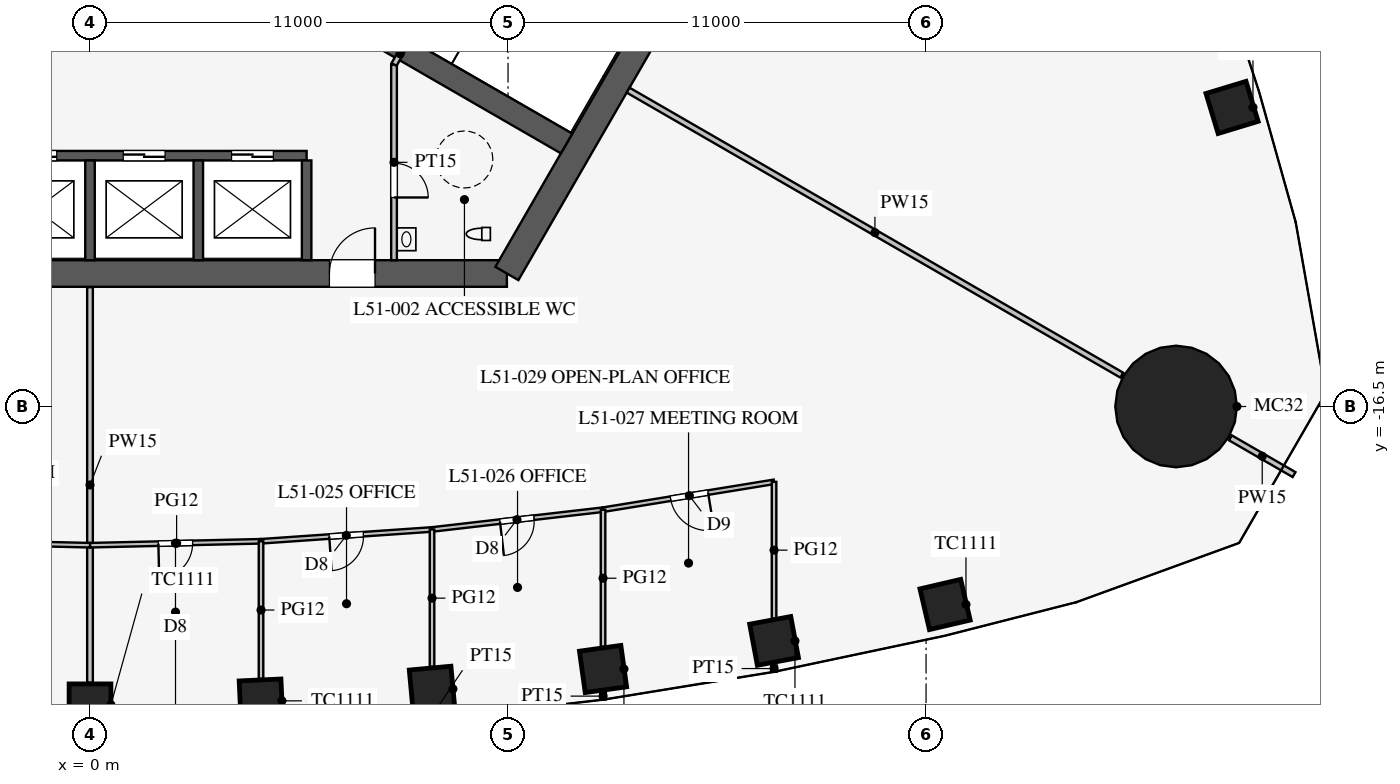
"""IFC4 building model, lengths in metres.
Left out: names, types, materials, properties, quantities, classifications, styles, units other than length and angle.
Written with IfcOpenShell. Run it as: python <this file> out.ifc"""

import sys

from ifc_helpers import new_model, si_unit, direction, frame, frame_2d, origin, origin_2d, place, context, subcontext, project, spatial, rectangle, circle, extrude, element, fill, save


model = new_model("IFC4")
c1 = context("Model", 3, precision=1e-05, world=origin(), true_north=direction((0.0, 1.0)))
c2 = subcontext(c1, "Body", "Model", "MODEL_VIEW")
j1 = project(units=[si_unit("LENGTHUNIT", "METRE"), si_unit("PLANEANGLEUNIT", "RADIAN")], contexts=[c1])
p1 = place(None, origin())
s1 = spatial("IfcSite", under=j1, at=p1, CompositionType="ELEMENT")
p2 = place(p1, origin())
s2 = spatial("IfcBuilding", under=s1, at=p2, CompositionType="ELEMENT")
p3 = place(p2, frame((0.0, 0.0, 223.3)))
s3 = spatial("IfcBuildingStorey", under=s2, at=p3, CompositionType="ELEMENT", Elevation=223.3)
for number, where, z_axis, x_axis in (
    (1, (0.0, -24.351, 0.0), (0.0, 0.0, 1.0), (1.0, 0.0, 0.0)),
    (2, (4.5, -24.246, 0.0), (0.0, 0.0, 1.0), (0.999, 0.046, 0.0)),
    (3, (9.0, -23.933, 0.0), (0.0, 0.0, 1.0), (0.996, 0.092, 0.0)),
    (4, (13.5, -23.408, 0.0), (0.0, 0.0, 1.0), (0.99, 0.138, 0.0)),
    (5, (18.0, -22.669, 0.0), (0.0, 0.0, 1.0), (0.983, 0.184, 0.0)),
    (6, (22.5, -21.71, 0.0), (0.0, 0.0, 1.0), (0.974, 0.227, 0.0)),
    (7, (30.052, -8.63, 0.0), (0.0, 0.0, 1.0), (-0.29, 0.957, 0.0)),
):
    element("IfcColumn", number, at=place(p3, frame(where, z_axis=z_axis, x_axis=x_axis)), inside=s3, PredefinedType="COLUMN", context=c2, shape_type="SweptSolid", body=[
        extrude(rectangle(XDim=1.1, YDim=1.1, at=origin_2d()), origin(), (0.0, 0.0, 1.0), 4.2),
    ])
p4 = place(p3, frame((28.579, -16.5, 0.0), z_axis=(0.0, 0.0, 1.0), x_axis=(1.0, 0.0, 0.0)))
e8 = element("IfcColumn", 8, at=p4, inside=s3, PredefinedType="COLUMN", context=c2, shape_type="SweptSolid", body=[
    extrude(circle(Radius=1.6, at=origin_2d()), origin(), (0.0, 0.0, 1.0), 4.2),
])
p5 = place(p3, frame((-10.97, -13.0, 0.0), z_axis=(0.0, 0.0, 1.0), x_axis=(1.0, 0.0, 0.0)))
e9 = element("IfcWall", 9, at=p5, inside=s3, PredefinedType="SHEAR", context=c2, shape_type="SweptSolid", body=[
    extrude(rectangle(XDim=21.939, YDim=0.7, at=frame_2d((10.97, 0.0))), origin(), (0.0, 0.0, 1.0), 4.2),
])
p6 = place(p5, frame((17.27, 0.0, 0.0)))
e10 = element("IfcOpeningElement", 10, at=p6, cuts=e9, PredefinedType="OPENING", context=c2, shape_type="SweptSolid", body=[
    extrude(rectangle(XDim=1.2, YDim=2.1, at=frame_2d((0.6, 1.05))), frame((0.0, 0.36, 0.0), z_axis=(0.0, -1.0, 0.0), x_axis=(1.0, 0.0, 0.0)), (0.0, 0.0, 1.0), 0.72),
])
p7 = place(p5, frame((3.47, 0.0, 0.0)))
e11 = element("IfcOpeningElement", 11, at=p7, cuts=e9, PredefinedType="OPENING", context=c2, shape_type="SweptSolid", body=[
    extrude(rectangle(XDim=1.2, YDim=2.1, at=frame_2d((0.6, 1.05))), frame((0.0, 0.36, 0.0), z_axis=(0.0, -1.0, 0.0), x_axis=(1.0, 0.0, 0.0)), (0.0, 0.0, 1.0), 0.72),
])
p8 = place(p3, frame((10.97, -13.0, 0.0), z_axis=(0.0, 0.0, 1.0), x_axis=(0.499995765644, 0.866027848477, 0.0)))
e12 = element("IfcWall", 12, at=p8, inside=s3, PredefinedType="SHEAR", context=c2, shape_type="SweptSolid", body=[
    extrude(rectangle(XDim=11.547, YDim=0.7, at=frame_2d((5.773, 0.0))), origin(), (0.0, 0.0, 1.0), 4.2),
])
p9 = place(p3, frame((-5.7, -9.9, 0.0), z_axis=(0.0, 0.0, 1.0), x_axis=(1.0, 0.0, 0.0)))
e13 = element("IfcWall", 13, at=p9, inside=s3, PredefinedType="SHEAR", context=c2, shape_type="SweptSolid", body=[
    extrude(rectangle(XDim=11.4, YDim=0.25, at=frame_2d((5.7, 0.0))), origin(), (0.0, 0.0, 1.0), 4.2),
])
p10 = place(p9, frame((0.875, 0.0, 0.0)))
e14 = element("IfcOpeningElement", 14, at=p10, cuts=e13, PredefinedType="OPENING", context=c2, shape_type="SweptSolid", body=[
    extrude(rectangle(XDim=1.1, YDim=2.2, at=frame_2d((0.55, 1.1))), frame((0.0, 0.135, 0.0), z_axis=(0.0, -1.0, 0.0), x_axis=(1.0, 0.0, 0.0)), (0.0, 0.0, 1.0), 0.27),
])
p11 = place(p9, frame((3.725, 0.0, 0.0)))
e15 = element("IfcOpeningElement", 15, at=p11, cuts=e13, PredefinedType="OPENING", context=c2, shape_type="SweptSolid", body=[
    extrude(rectangle(XDim=1.1, YDim=2.2, at=frame_2d((0.55, 1.1))), frame((0.0, 0.135, 0.0), z_axis=(0.0, -1.0, 0.0), x_axis=(1.0, 0.0, 0.0)), (0.0, 0.0, 1.0), 0.27),
])
p12 = place(p9, frame((6.575, 0.0, 0.0)))
e16 = element("IfcOpeningElement", 16, at=p12, cuts=e13, PredefinedType="OPENING", context=c2, shape_type="SweptSolid", body=[
    extrude(rectangle(XDim=1.1, YDim=2.2, at=frame_2d((0.55, 1.1))), frame((0.0, 0.135, 0.0), z_axis=(0.0, -1.0, 0.0), x_axis=(1.0, 0.0, 0.0)), (0.0, 0.0, 1.0), 0.27),
])
p13 = place(p9, frame((9.425, 0.0, 0.0)))
e17 = element("IfcOpeningElement", 17, at=p13, cuts=e13, PredefinedType="OPENING", context=c2, shape_type="SweptSolid", body=[
    extrude(rectangle(XDim=1.1, YDim=2.2, at=frame_2d((0.55, 1.1))), frame((0.0, 0.135, 0.0), z_axis=(0.0, -1.0, 0.0), x_axis=(1.0, 0.0, 0.0)), (0.0, 0.0, 1.0), 0.27),
])
for number, where, z_axis, x_axis in (
    (18, (0.0, -10.025, 0.0), (0.0, 0.0, 1.0), (0.0, -1.0, 0.0)),
    (19, (2.85, -10.025, 0.0), (0.0, 0.0, 1.0), (0.0, -1.0, 0.0)),
    (20, (5.7, -10.025, 0.0), (0.0, 0.0, 1.0), (0.0, -1.0, 0.0)),
):
    element("IfcWall", number, at=place(p3, frame(where, z_axis=z_axis, x_axis=x_axis)), inside=s3, PredefinedType="SHEAR", context=c2, shape_type="SweptSolid", body=[
        extrude(rectangle(XDim=2.625, YDim=0.25, at=frame_2d((1.312, 0.0))), origin(), (0.0, 0.0, 1.0), 4.2),
    ])
p14 = place(p3, frame((4.638, -5.016, 0.0), z_axis=(0.0, 0.0, 1.0), x_axis=(0.866021621257, -0.500006551472, 0.0)))
e21 = element("IfcWall", 21, at=p14, inside=s3, PredefinedType="SHEAR", context=c2, shape_type="SweptSolid", body=[
    extrude(rectangle(XDim=9.125, YDim=0.6, at=frame_2d((4.562, 0.0))), origin(), (0.0, 0.0, 1.0), 4.2),
])
p15 = place(p3, frame((8.0, -7.5, 0.0), z_axis=(0.0, 0.0, 1.0), x_axis=(0.0, -1.0, 0.0)))
e22 = element("IfcWall", 22, at=p15, inside=s3, PredefinedType="PARTITIONING", context=c2, shape_type="SweptSolid", body=[
    extrude(rectangle(XDim=5.15, YDim=0.15, at=frame_2d((2.575, 0.0))), origin(), (0.0, 0.0, 1.0), 4.0),
])
p16 = place(p15, frame((2.6, 0.0, 0.0)))
e23 = element("IfcOpeningElement", 23, at=p16, cuts=e22, PredefinedType="OPENING", context=c2, shape_type="SweptSolid", body=[
    extrude(rectangle(XDim=0.9, YDim=2.1, at=frame_2d((0.45, 1.05))), frame((0.0, 0.085, 0.0), z_axis=(0.0, -1.0, 0.0), x_axis=(1.0, 0.0, 0.0)), (0.0, 0.0, 1.0), 0.17),
])
p17 = place(p3, frame((8.0, -7.5, 0.0), z_axis=(0.0, 0.0, 1.0), x_axis=(0.499842556608, 0.866116284689, 0.0)))
e24 = element("IfcWall", 24, at=p17, inside=s3, PredefinedType="PARTITIONING", context=c2, shape_type="SweptSolid", body=[
    extrude(rectangle(XDim=0.645, YDim=0.15, at=frame_2d((0.323, 0.0))), origin(), (0.0, 0.0, 1.0), 4.0),
])
p18 = place(p3, frame((14.159, -8.175, 0.0), z_axis=(0.0, 0.0, 1.0), x_axis=(0.866027028085, -0.499997186618, 0.0)))
e25 = element("IfcWall", 25, at=p18, inside=s3, PredefinedType="PARTITIONING", context=c2, shape_type="SweptSolid", body=[
    extrude(rectangle(XDim=15.0, YDim=0.15, at=frame_2d((7.5, 0.0))), origin(), (0.0, 0.0, 1.0), 2.4),
])
p19 = place(p3, frame((30.008, -17.325, 0.0), z_axis=(0.0, 0.0, 1.0), x_axis=(0.866013246922, -0.500021055713, 0.0)))
e26 = element("IfcWall", 26, at=p19, inside=s3, PredefinedType="PARTITIONING", context=c2, shape_type="SweptSolid", body=[
    extrude(rectangle(XDim=1.935, YDim=0.15, at=frame_2d((0.967, 0.0))), origin(), (0.0, 0.0, 1.0), 2.4),
])
p20 = place(p3, frame((0.0, -13.36, 0.0), z_axis=(0.0, 0.0, 1.0), x_axis=(0.0, -1.0, 0.0)))
e27 = element("IfcWall", 27, at=p20, inside=s3, PredefinedType="PARTITIONING", context=c2, shape_type="SweptSolid", body=[
    extrude(rectangle(XDim=10.411, YDim=0.15, at=frame_2d((5.205, 0.0))), origin(), (0.0, 0.0, 1.0), 3.3),
])
p21 = place(p3, frame((13.5, -24.033, 0.0), z_axis=(0.0, 0.0, 1.0), x_axis=(0.0, -1.0, 0.0)))
e28 = element("IfcWall", 28, at=p21, inside=s3, PredefinedType="PARTITIONING", context=c2, shape_type="SweptSolid", body=[
    extrude(rectangle(XDim=0.178, YDim=0.15, at=frame_2d((0.089, 0.0))), origin(), (0.0, 0.0, 1.0), 2.9),
])
p22 = place(p3, frame((18.0, -23.315, 0.0), z_axis=(0.0, 0.0, 1.0), x_axis=(0.0, -1.0, 0.0)))
e29 = element("IfcWall", 29, at=p22, inside=s3, PredefinedType="PARTITIONING", context=c2, shape_type="SweptSolid", body=[
    extrude(rectangle(XDim=0.163, YDim=0.15, at=frame_2d((0.082, 0.0))), origin(), (0.0, 0.0, 1.0), 2.9),
])
p23 = place(p3, frame((0.0, -20.151, 0.0), z_axis=(0.0, 0.0, 1.0), x_axis=(0.99973552509, 0.022997388381, 0.0)))
e30 = element("IfcWall", 30, at=p23, inside=s3, PredefinedType="PARTITIONING", context=c2, shape_type="SweptSolid", body=[
    extrude(rectangle(XDim=4.501, YDim=0.12, at=frame_2d((2.25, 0.0))), origin(), (0.0, 0.0, 1.0), 2.9),
])
p24 = place(p23, frame((1.8, 0.0, 0.15)))
e31 = element("IfcOpeningElement", 31, at=p24, cuts=e30, PredefinedType="OPENING", context=c2, shape_type="SweptSolid", body=[
    extrude(rectangle(XDim=0.9, YDim=2.1, at=frame_2d((0.45, 1.05))), frame((0.0, 0.07, 0.0), z_axis=(0.0, -1.0, 0.0), x_axis=(1.0, 0.0, 0.0)), (0.0, 0.0, 1.0), 0.14),
])
p25 = place(p3, frame((13.5, -19.216, 0.0), z_axis=(0.0, 0.0, 1.0), x_axis=(0.986986525477, 0.160802980469, 0.0)))
e32 = element("IfcWall", 32, at=p25, inside=s3, PredefinedType="PARTITIONING", context=c2, shape_type="SweptSolid", body=[
    extrude(rectangle(XDim=4.559, YDim=0.12, at=frame_2d((2.28, 0.0))), origin(), (0.0, 0.0, 1.0), 2.9),
])
p26 = place(p25, frame((1.8, 0.0, 0.15)))
e33 = element("IfcOpeningElement", 33, at=p26, cuts=e32, PredefinedType="OPENING", context=c2, shape_type="SweptSolid", body=[
    extrude(rectangle(XDim=1.0, YDim=2.1, at=frame_2d((0.5, 1.05))), frame((0.0, 0.07, 0.0), z_axis=(0.0, -1.0, 0.0), x_axis=(1.0, 0.0, 0.0)), (0.0, 0.0, 1.0), 0.14),
])
p27 = place(p3, frame((4.5, -20.047, 0.0), z_axis=(0.0, 0.0, 1.0), x_axis=(0.997623533978, 0.068900540297, 0.0)))
e34 = element("IfcWall", 34, at=p27, inside=s3, PredefinedType="PARTITIONING", context=c2, shape_type="SweptSolid", body=[
    extrude(rectangle(XDim=4.511, YDim=0.12, at=frame_2d((2.255, 0.0))), origin(), (0.0, 0.0, 1.0), 2.9),
])
p28 = place(p27, frame((1.8, 0.0, 0.15)))
e35 = element("IfcOpeningElement", 35, at=p28, cuts=e34, PredefinedType="OPENING", context=c2, shape_type="SweptSolid", body=[
    extrude(rectangle(XDim=0.9, YDim=2.1, at=frame_2d((0.45, 1.05))), frame((0.0, 0.07, 0.0), z_axis=(0.0, -1.0, 0.0), x_axis=(1.0, 0.0, 0.0)), (0.0, 0.0, 1.0), 0.14),
])
p29 = place(p3, frame((9.0, -19.736, 0.0), z_axis=(0.0, 0.0, 1.0), x_axis=(0.993382946625, 0.114849124309, 0.0)))
e36 = element("IfcWall", 36, at=p29, inside=s3, PredefinedType="PARTITIONING", context=c2, shape_type="SweptSolid", body=[
    extrude(rectangle(XDim=4.53, YDim=0.12, at=frame_2d((2.265, 0.0))), origin(), (0.0, 0.0, 1.0), 2.9),
])
p30 = place(p29, frame((1.8, 0.0, 0.15)))
e37 = element("IfcOpeningElement", 37, at=p30, cuts=e36, PredefinedType="OPENING", context=c2, shape_type="SweptSolid", body=[
    extrude(rectangle(XDim=0.9, YDim=2.1, at=frame_2d((0.45, 1.05))), frame((0.0, 0.07, 0.0), z_axis=(0.0, -1.0, 0.0), x_axis=(1.0, 0.0, 0.0)), (0.0, 0.0, 1.0), 0.14),
])
p31 = place(p3, frame((-4.5, -20.047, 0.0), z_axis=(0.0, 0.0, 1.0), x_axis=(0.99973552509, -0.022997388381, 0.0)))
e38 = element("IfcWall", 38, at=p31, inside=s3, PredefinedType="PARTITIONING", context=c2, shape_type="SweptSolid", body=[
    extrude(rectangle(XDim=4.501, YDim=0.12, at=frame_2d((2.25, 0.0))), origin(), (0.0, 0.0, 1.0), 2.9),
])
p32 = place(p31, frame((1.8, 0.0, 0.15)))
e39 = element("IfcOpeningElement", 39, at=p32, cuts=e38, PredefinedType="OPENING", context=c2, shape_type="SweptSolid", body=[
    extrude(rectangle(XDim=0.9, YDim=2.1, at=frame_2d((0.45, 1.05))), frame((0.0, 0.07, 0.0), z_axis=(0.0, -1.0, 0.0), x_axis=(1.0, 0.0, 0.0)), (0.0, 0.0, 1.0), 0.14),
])
p33 = place(p3, frame((13.5, -19.216, 0.0), z_axis=(0.0, 0.0, 1.0), x_axis=(0.0, -1.0, 0.0)))
e40 = element("IfcWall", 40, at=p33, inside=s3, PredefinedType="PARTITIONING", context=c2, shape_type="SweptSolid", body=[
    extrude(rectangle(XDim=3.607, YDim=0.12, at=frame_2d((1.803, 0.0))), origin(), (0.0, 0.0, 1.0), 2.9),
])
p34 = place(p3, frame((18.0, -18.483, 0.0), z_axis=(0.0, 0.0, 1.0), x_axis=(0.0, -1.0, 0.0)))
e41 = element("IfcWall", 41, at=p34, inside=s3, PredefinedType="PARTITIONING", context=c2, shape_type="SweptSolid", body=[
    extrude(rectangle(XDim=3.596, YDim=0.12, at=frame_2d((1.798, 0.0))), origin(), (0.0, 0.0, 1.0), 2.9),
])
p35 = place(p3, frame((4.5, -20.047, 0.0), z_axis=(0.0, 0.0, 1.0), x_axis=(0.0, -1.0, 0.0)))
e42 = element("IfcWall", 42, at=p35, inside=s3, PredefinedType="PARTITIONING", context=c2, shape_type="SweptSolid", body=[
    extrude(rectangle(XDim=3.619, YDim=0.12, at=frame_2d((1.809, 0.0))), origin(), (0.0, 0.0, 1.0), 2.9),
])
p36 = place(p3, frame((9.0, -19.736, 0.0), z_axis=(0.0, 0.0, 1.0), x_axis=(0.0, -1.0, 0.0)))
e43 = element("IfcWall", 43, at=p36, inside=s3, PredefinedType="PARTITIONING", context=c2, shape_type="SweptSolid", body=[
    extrude(rectangle(XDim=3.614, YDim=0.12, at=frame_2d((1.807, 0.0))), origin(), (0.0, 0.0, 1.0), 2.9),
])
p37 = place(p3, frame((-0.016, 30.392, 0.0), z_axis=(0.0, 0.0, 1.0), x_axis=(-0.500000626146, -0.866025042278, 0.0)))
e44 = element("IfcWall", 44, at=p37, inside=s3, PredefinedType="PARTITIONING", context=c2, shape_type="SweptSolid", body=[
    extrude(rectangle(XDim=52.624, YDim=0.12, at=frame_2d((26.312, 0.0))), origin(), (0.0, 0.0, 1.0), 2.9),
])
p38 = place(p37, frame((10.15, 0.0, 0.15)))
e45 = element("IfcOpeningElement", 45, at=p38, cuts=e44, PredefinedType="OPENING", context=c2, shape_type="SweptSolid", body=[
    extrude(rectangle(XDim=1.8, YDim=2.1, at=frame_2d((0.9, 1.05))), frame((0.0, 0.07, 0.0), z_axis=(0.0, -1.0, 0.0), x_axis=(1.0, 0.0, 0.0)), (0.0, 0.0, 1.0), 0.14),
])
p39 = place(p37, frame((40.65, 0.0, 0.15)))
e46 = element("IfcOpeningElement", 46, at=p39, cuts=e44, PredefinedType="OPENING", context=c2, shape_type="SweptSolid", body=[
    extrude(rectangle(XDim=1.8, YDim=2.1, at=frame_2d((0.9, 1.05))), frame((0.0, 0.07, 0.0), z_axis=(0.0, -1.0, 0.0), x_axis=(1.0, 0.0, 0.0)), (0.0, 0.0, 1.0), 0.14),
])
p40 = place(p16, origin())
e47 = element("IfcDoor", 47, at=p40, inside=s3, OperationType="SINGLE_SWING_RIGHT", PredefinedType="DOOR", context=c2, shape_type="SweptSolid", body=[
    extrude(rectangle(XDim=0.9, YDim=2.1, at=frame_2d((0.45, 1.05))), frame((0.0, 0.025, 0.0), z_axis=(0.0, -1.0, 0.0), x_axis=(1.0, 0.0, 0.0)), (0.0, 0.0, 1.0), 0.05),
])
fill(e23, e47)
p41 = place(p6, origin())
e48 = element("IfcDoor", 48, at=p41, inside=s3, OperationType="SINGLE_SWING_RIGHT", PredefinedType="DOOR", context=c2, shape_type="SweptSolid", body=[
    extrude(rectangle(XDim=1.2, YDim=2.1, at=frame_2d((0.6, 1.05))), frame((0.0, 0.025, 0.0), z_axis=(0.0, -1.0, 0.0), x_axis=(1.0, 0.0, 0.0)), (0.0, 0.0, 1.0), 0.05),
])
fill(e10, e48)
p42 = place(p24, frame((0.9, 0.0, 0.0), z_axis=(0.0, 0.0, 1.0), x_axis=(-1.0, 0.0, 0.0)))
e49 = element("IfcDoor", 49, at=p42, inside=s3, OperationType="SINGLE_SWING_RIGHT", PredefinedType="DOOR", context=c2, shape_type="SweptSolid", body=[
    extrude(rectangle(XDim=0.9, YDim=2.1, at=frame_2d((0.45, 1.05))), frame((0.0, 0.025, 0.0), z_axis=(0.0, -1.0, 0.0), x_axis=(1.0, 0.0, 0.0)), (0.0, 0.0, 1.0), 0.05),
])
fill(e31, e49)
p43 = place(p28, frame((0.9, 0.0, 0.0), z_axis=(0.0, 0.0, 1.0), x_axis=(-1.0, 0.0, 0.0)))
e50 = element("IfcDoor", 50, at=p43, inside=s3, OperationType="SINGLE_SWING_RIGHT", PredefinedType="DOOR", context=c2, shape_type="SweptSolid", body=[
    extrude(rectangle(XDim=0.9, YDim=2.1, at=frame_2d((0.45, 1.05))), frame((0.0, 0.025, 0.0), z_axis=(0.0, -1.0, 0.0), x_axis=(1.0, 0.0, 0.0)), (0.0, 0.0, 1.0), 0.05),
])
fill(e35, e50)
p44 = place(p30, frame((0.9, 0.0, 0.0), z_axis=(0.0, 0.0, 1.0), x_axis=(-1.0, 0.0, 0.0)))
e51 = element("IfcDoor", 51, at=p44, inside=s3, OperationType="SINGLE_SWING_RIGHT", PredefinedType="DOOR", context=c2, shape_type="SweptSolid", body=[
    extrude(rectangle(XDim=0.9, YDim=2.1, at=frame_2d((0.45, 1.05))), frame((0.0, 0.025, 0.0), z_axis=(0.0, -1.0, 0.0), x_axis=(1.0, 0.0, 0.0)), (0.0, 0.0, 1.0), 0.05),
])
fill(e37, e51)
p45 = place(p26, frame((1.0, 0.0, 0.0), z_axis=(0.0, 0.0, 1.0), x_axis=(-1.0, 0.0, 0.0)))
e52 = element("IfcDoor", 52, at=p45, inside=s3, OperationType="SINGLE_SWING_LEFT", PredefinedType="DOOR", context=c2, shape_type="SweptSolid", body=[
    extrude(rectangle(XDim=1.0, YDim=2.1, at=frame_2d((0.5, 1.05))), frame((0.0, 0.025, 0.0), z_axis=(0.0, -1.0, 0.0), x_axis=(1.0, 0.0, 0.0)), (0.0, 0.0, 1.0), 0.05),
])
fill(e33, e52)
p46 = place(p11, origin())
e53 = element("IfcDoor", 53, at=p46, inside=s3, OperationType="DOUBLE_DOOR_SLIDING", PredefinedType="DOOR", context=c2, shape_type="SweptSolid", body=[
    extrude(rectangle(XDim=1.1, YDim=2.2, at=frame_2d((0.55, 1.1))), frame((0.0, 0.025, 0.0), z_axis=(0.0, -1.0, 0.0), x_axis=(1.0, 0.0, 0.0)), (0.0, 0.0, 1.0), 0.05),
])
fill(e15, e53)
p47 = place(p12, origin())
e54 = element("IfcDoor", 54, at=p47, inside=s3, OperationType="DOUBLE_DOOR_SLIDING", PredefinedType="DOOR", context=c2, shape_type="SweptSolid", body=[
    extrude(rectangle(XDim=1.1, YDim=2.2, at=frame_2d((0.55, 1.1))), frame((0.0, 0.025, 0.0), z_axis=(0.0, -1.0, 0.0), x_axis=(1.0, 0.0, 0.0)), (0.0, 0.0, 1.0), 0.05),
])
fill(e16, e54)
p48 = place(p13, origin())
e55 = element("IfcDoor", 55, at=p48, inside=s3, OperationType="DOUBLE_DOOR_SLIDING", PredefinedType="DOOR", context=c2, shape_type="SweptSolid", body=[
    extrude(rectangle(XDim=1.1, YDim=2.2, at=frame_2d((0.55, 1.1))), frame((0.0, 0.025, 0.0), z_axis=(0.0, -1.0, 0.0), x_axis=(1.0, 0.0, 0.0)), (0.0, 0.0, 1.0), 0.05),
])
fill(e17, e55)
save(model, sys.argv[1])
